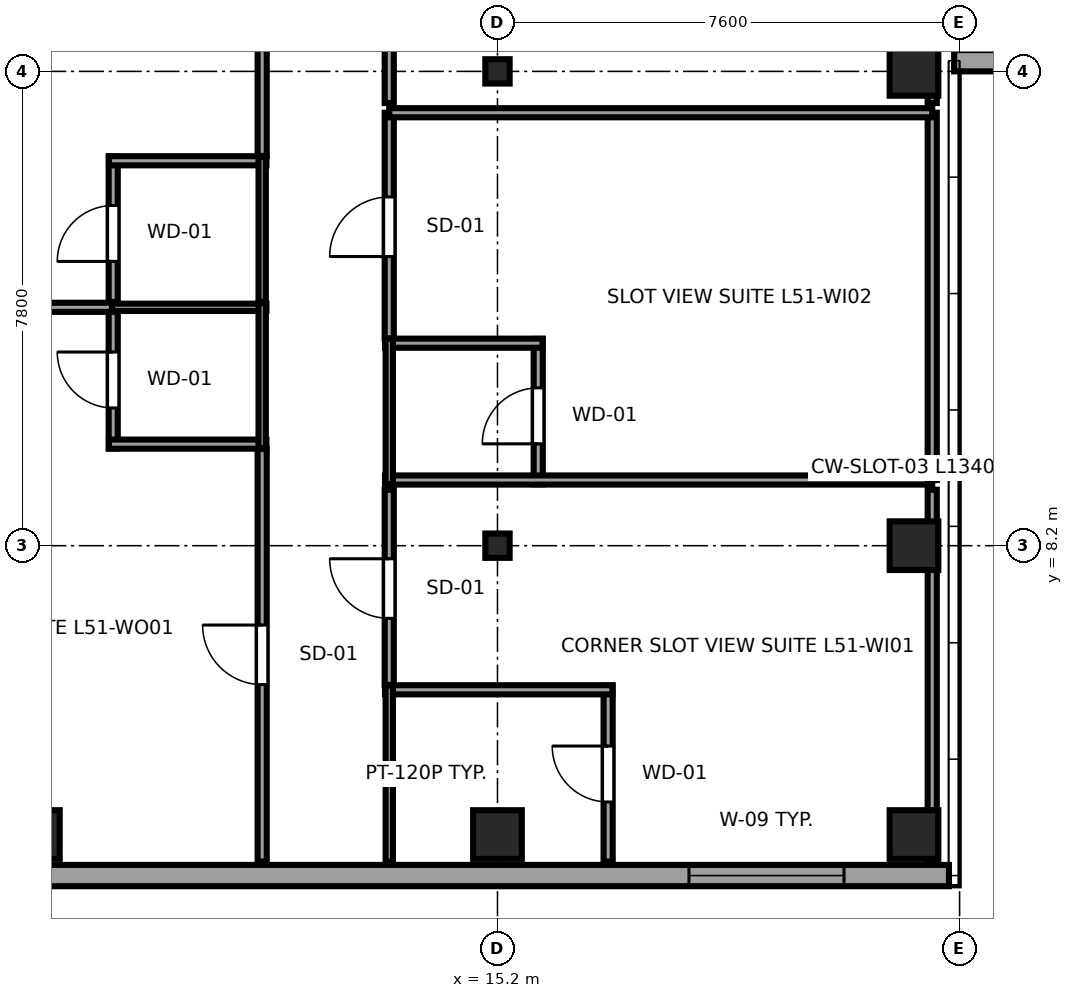
"""IFC4 building model, lengths in metres.
Left out: names, types, materials, properties, quantities, classifications, styles, units other than length and angle.
Written with IfcOpenShell. Run it as: python <this file> out.ifc"""

import sys

from ifc_helpers import new_model, si_unit, direction, frame, frame_2d, origin, origin_2d, place, context, subcontext, project, spatial, rectangle, i_section, extrude, source, transform, mapped, element, fill, save


model = new_model("IFC4")
c1 = context("Model", 3, precision=1e-05, world=origin(), true_north=direction((0.0, 1.0)))
c2 = subcontext(c1, "Body", "Model", "MODEL_VIEW")
j1 = project(units=[si_unit("LENGTHUNIT", "METRE"), si_unit("PLANEANGLEUNIT", "RADIAN")], contexts=[c1])
p1 = place(None, origin())
s1 = spatial("IfcSite", under=j1, at=p1, CompositionType="ELEMENT")
p2 = place(p1, origin())
s2 = spatial("IfcBuilding", under=s1, at=p2, CompositionType="ELEMENT")
p3 = place(p2, frame((0.0, 0.0, 194.65)))
s3 = spatial("IfcBuildingStorey", under=s2, at=p3, CompositionType="ELEMENT", Elevation=194.65)
m1 = source(origin(), c2, "Body", "SweptSolid", [
    extrude(rectangle(XDim=0.8, YDim=0.8, at=origin_2d()), origin(), (0.0, 0.0, 1.0), 3.55),
])
for number, where, z_axis, x_axis in (
    (1, (7.6, 3.45, 0.0), (0.0, 0.0, 1.0), (1.0, 0.0, 0.0)),
    (2, (15.2, 3.45, 0.0), (0.0, 0.0, 1.0), (1.0, 0.0, 0.0)),
):
    element("IfcColumn", number, at=place(p3, frame(where, z_axis=z_axis, x_axis=x_axis)), inside=s3, PredefinedType="COLUMN", context=c2, shape_type="MappedRepresentation", body=[
        mapped(m1, transform((0.0, 0.0, 0.0), x_axis=(1.0, 0.0, 0.0), y_axis=(0.0, 1.0, 0.0), z_axis=(0.0, 0.0, 1.0), scale=1.0)),
    ])
m2 = source(origin(), c2, "Body", "SweptSolid", [
    extrude(i_section(OverallWidth=0.4, OverallDepth=0.4, WebThickness=0.02, FlangeThickness=0.035, at=origin_2d()), origin(), (0.0, 0.0, 1.0), 3.55),
])
for number, where, z_axis, x_axis in (
    (3, (15.2, 8.2, 0.0), (0.0, 0.0, 1.0), (1.0, 0.0, 0.0)),
    (4, (15.2, 16.0, 0.0), (0.0, 0.0, 1.0), (1.0, 0.0, 0.0)),
):
    element("IfcColumn", number, at=place(p3, frame(where, z_axis=z_axis, x_axis=x_axis)), inside=s3, PredefinedType="COLUMN", context=c2, shape_type="MappedRepresentation", body=[
        mapped(m2, transform((0.0, 0.0, 0.0), x_axis=(1.0, 0.0, 0.0), y_axis=(0.0, 1.0, 0.0), z_axis=(0.0, 0.0, 1.0), scale=1.0)),
    ])
for number, where, z_axis, x_axis in (
    (5, (22.05, 3.45, 0.0), (0.0, 0.0, 1.0), (1.0, 0.0, 0.0)),
    (6, (22.05, 8.2, 0.0), (0.0, 0.0, 1.0), (1.0, 0.0, 0.0)),
    (7, (22.05, 16.0, 0.0), (0.0, 0.0, 1.0), (1.0, 0.0, 0.0)),
):
    element("IfcColumn", number, at=place(p3, frame(where, z_axis=z_axis, x_axis=x_axis)), inside=s3, PredefinedType="COLUMN", context=c2, shape_type="MappedRepresentation", body=[
        mapped(m1, transform((0.0, 0.0, 0.0), x_axis=(1.0, 0.0, 0.0), y_axis=(0.0, 1.0, 0.0), z_axis=(0.0, 0.0, 1.0), scale=1.0)),
    ])
p4 = place(p3, frame((7.017, 2.775, 0.0), z_axis=(0.0, 0.0, 1.0), x_axis=(1.0, 0.0, 0.0)))
e8 = element("IfcWall", 8, at=p4, inside=s3, PredefinedType="SOLIDWALL", context=c2, shape_type="SweptSolid", body=[
    extrude(rectangle(XDim=15.608, YDim=0.35, at=frame_2d((7.804, 0.0))), origin(), (0.0, 0.0, 1.0), 3.37),
])
p5 = place(p4, frame((11.332, 0.0, 0.68)))
e9 = element("IfcOpeningElement", 9, at=p5, cuts=e8, PredefinedType="OPENING", context=c2, shape_type="SweptSolid", body=[
    extrude(rectangle(XDim=2.55, YDim=1.92, at=frame_2d((1.275, 0.96))), frame((0.0, 0.185, 0.0), z_axis=(0.0, -1.0, 0.0), x_axis=(1.0, 0.0, 0.0)), (0.0, 0.0, 1.0), 0.37),
])
p6 = place(p3, frame((22.71, 16.175, 0.0), z_axis=(0.0, 0.0, 1.0), x_axis=(1.0, 0.0, 0.0)))
e10 = element("IfcWall", 10, at=p6, inside=s3, PredefinedType="SOLIDWALL", context=c2, shape_type="SweptSolid", body=[
    extrude(rectangle(XDim=11.58, YDim=0.35, at=frame_2d((5.79, 0.0))), origin(), (0.0, 0.0, 1.0), 2.758),
])
p7 = place(p6, frame((1.92, 0.0, 0.68)))
e11 = element("IfcOpeningElement", 11, at=p7, cuts=e10, PredefinedType="OPENING", context=c2, shape_type="SweptSolid", body=[
    extrude(rectangle(XDim=2.55, YDim=1.92, at=frame_2d((1.275, 0.96))), frame((0.0, 0.185, 0.0), z_axis=(0.0, -1.0, 0.0), x_axis=(1.0, 0.0, 0.0)), (0.0, 0.0, 1.0), 0.37),
])
p8 = place(p6, frame((7.11, 0.0, 0.68)))
e12 = element("IfcOpeningElement", 12, at=p8, cuts=e10, PredefinedType="OPENING", context=c2, shape_type="SweptSolid", body=[
    extrude(rectangle(XDim=2.55, YDim=1.92, at=frame_2d((1.275, 0.96))), frame((0.0, 0.185, 0.0), z_axis=(0.0, -1.0, 0.0), x_axis=(1.0, 0.0, 0.0)), (0.0, 0.0, 1.0), 0.37),
])
p9 = place(p3, frame((8.88, 9.8, 0.0), z_axis=(0.0, 0.0, 1.0), x_axis=(0.0, 1.0, 0.0)))
e13 = element("IfcWall", 13, at=p9, inside=s3, PredefinedType="PARTITIONING", context=c2, shape_type="SweptSolid", body=[
    extrude(rectangle(XDim=2.39, YDim=0.15, at=frame_2d((1.195, 0.0))), origin(), (0.0, 0.0, 1.0), 3.37),
])
p10 = place(p9, frame((0.665, 0.0, 0.0)))
e14 = element("IfcOpeningElement", 14, at=p10, cuts=e13, PredefinedType="OPENING", context=c2, shape_type="SweptSolid", body=[
    extrude(rectangle(XDim=0.92, YDim=2.01, at=frame_2d((0.46, 1.005))), frame((0.0, 0.085, 0.0), z_axis=(0.0, -1.0, 0.0), x_axis=(1.0, 0.0, 0.0)), (0.0, 0.0, 1.0), 0.17),
])
p11 = place(p3, frame((8.81, 9.87, 0.0), z_axis=(0.0, 0.0, 1.0), x_axis=(1.0, 0.0, 0.0)))
e15 = element("IfcWall", 15, at=p11, inside=s3, PredefinedType="PARTITIONING", context=c2, shape_type="SweptSolid", body=[
    extrude(rectangle(XDim=2.59, YDim=0.15, at=frame_2d((1.295, 0.0))), origin(), (0.0, 0.0, 1.0), 3.37),
])
p12 = place(p3, frame((8.81, 12.12, 0.0), z_axis=(0.0, 0.0, 1.0), x_axis=(1.0, 0.0, 0.0)))
e16 = element("IfcWall", 16, at=p12, inside=s3, PredefinedType="PLUMBINGWALL", context=c2, shape_type="SweptSolid", body=[
    extrude(rectangle(XDim=2.59, YDim=0.12, at=frame_2d((1.295, 0.0))), origin(), (0.0, 0.0, 1.0), 3.37),
])
p13 = place(p3, frame((11.33, 9.8, 0.0), z_axis=(0.0, 0.0, 1.0), x_axis=(0.0, 1.0, 0.0)))
e17 = element("IfcWall", 17, at=p13, inside=s3, PredefinedType="PLUMBINGWALL", context=c2, shape_type="SweptSolid", body=[
    extrude(rectangle(XDim=2.39, YDim=0.12, at=frame_2d((1.195, 0.0))), origin(), (0.0, 0.0, 1.0), 3.001),
])
p14 = place(p3, frame((8.88, 12.21, 0.0), z_axis=(0.0, 0.0, 1.0), x_axis=(0.0, 1.0, 0.0)))
e18 = element("IfcWall", 18, at=p14, inside=s3, PredefinedType="PARTITIONING", context=c2, shape_type="SweptSolid", body=[
    extrude(rectangle(XDim=2.39, YDim=0.15, at=frame_2d((1.195, 0.0))), origin(), (0.0, 0.0, 1.0), 3.37),
])
p15 = place(p14, frame((0.665, 0.0, 0.0)))
e19 = element("IfcOpeningElement", 19, at=p15, cuts=e18, PredefinedType="OPENING", context=c2, shape_type="SweptSolid", body=[
    extrude(rectangle(XDim=0.92, YDim=2.01, at=frame_2d((0.46, 1.005))), frame((0.0, 0.085, 0.0), z_axis=(0.0, -1.0, 0.0), x_axis=(1.0, 0.0, 0.0)), (0.0, 0.0, 1.0), 0.17),
])
p16 = place(p3, frame((8.81, 14.53, 0.0), z_axis=(0.0, 0.0, 1.0), x_axis=(1.0, 0.0, 0.0)))
e20 = element("IfcWall", 20, at=p16, inside=s3, PredefinedType="PARTITIONING", context=c2, shape_type="SweptSolid", body=[
    extrude(rectangle(XDim=2.59, YDim=0.15, at=frame_2d((1.295, 0.0))), origin(), (0.0, 0.0, 1.0), 3.37),
])
p17 = place(p3, frame((11.33, 12.21, 0.0), z_axis=(0.0, 0.0, 1.0), x_axis=(0.0, 1.0, 0.0)))
e21 = element("IfcWall", 21, at=p17, inside=s3, PredefinedType="PLUMBINGWALL", context=c2, shape_type="SweptSolid", body=[
    extrude(rectangle(XDim=2.39, YDim=0.12, at=frame_2d((1.195, 0.0))), origin(), (0.0, 0.0, 1.0), 3.001),
])
p18 = place(p3, frame((17.02, 3.005, 0.0), z_axis=(0.0, 0.0, 1.0), x_axis=(0.0, 1.0, 0.0)))
e22 = element("IfcWall", 22, at=p18, inside=s3, PredefinedType="PARTITIONING", context=c2, shape_type="SweptSolid", body=[
    extrude(rectangle(XDim=2.895, YDim=0.15, at=frame_2d((1.448, 0.0))), origin(), (0.0, 0.0, 1.0), 3.37),
])
p19 = place(p18, frame((0.98, 0.0, 0.0)))
e23 = element("IfcOpeningElement", 23, at=p19, cuts=e22, PredefinedType="OPENING", context=c2, shape_type="SweptSolid", body=[
    extrude(rectangle(XDim=0.92, YDim=2.01, at=frame_2d((0.46, 1.005))), frame((0.0, 0.085, 0.0), z_axis=(0.0, -1.0, 0.0), x_axis=(1.0, 0.0, 0.0)), (0.0, 0.0, 1.0), 0.17),
])
p20 = place(p3, frame((13.35, 5.83, 0.0), z_axis=(0.0, 0.0, 1.0), x_axis=(1.0, 0.0, 0.0)))
e24 = element("IfcWall", 24, at=p20, inside=s3, PredefinedType="PARTITIONING", context=c2, shape_type="SweptSolid", body=[
    extrude(rectangle(XDim=3.74, YDim=0.15, at=frame_2d((1.87, 0.0))), origin(), (0.0, 0.0, 1.0), 3.37),
])
p21 = place(p3, frame((13.42, 3.005, 0.0), z_axis=(0.0, 0.0, 1.0), x_axis=(0.0, 1.0, 0.0)))
e25 = element("IfcWall", 25, at=p21, inside=s3, PredefinedType="PLUMBINGWALL", context=c2, shape_type="SweptSolid", body=[
    extrude(rectangle(XDim=2.895, YDim=0.12, at=frame_2d((1.448, 0.0))), origin(), (0.0, 0.0, 1.0), 3.37),
])
p22 = place(p3, frame((15.87, 9.21, 0.0), z_axis=(0.0, 0.0, 1.0), x_axis=(0.0, 1.0, 0.0)))
e26 = element("IfcWall", 26, at=p22, inside=s3, PredefinedType="PARTITIONING", context=c2, shape_type="SweptSolid", body=[
    extrude(rectangle(XDim=2.39, YDim=0.15, at=frame_2d((1.195, 0.0))), origin(), (0.0, 0.0, 1.0), 3.37),
])
p23 = place(p22, frame((0.665, 0.0, 0.0)))
e27 = element("IfcOpeningElement", 27, at=p23, cuts=e26, PredefinedType="OPENING", context=c2, shape_type="SweptSolid", body=[
    extrude(rectangle(XDim=0.92, YDim=2.01, at=frame_2d((0.46, 1.005))), frame((0.0, 0.085, 0.0), z_axis=(0.0, -1.0, 0.0), x_axis=(1.0, 0.0, 0.0)), (0.0, 0.0, 1.0), 0.17),
])
p24 = place(p3, frame((13.35, 9.28, 0.0), z_axis=(0.0, 0.0, 1.0), x_axis=(1.0, 0.0, 0.0)))
e28 = element("IfcWall", 28, at=p24, inside=s3, PredefinedType="PARTITIONING", context=c2, shape_type="SweptSolid", body=[
    extrude(rectangle(XDim=9.0, YDim=0.15, at=frame_2d((4.5, 0.0))), origin(), (0.0, 0.0, 1.0), 3.37),
])
p25 = place(p3, frame((13.35, 11.53, 0.0), z_axis=(0.0, 0.0, 1.0), x_axis=(1.0, 0.0, 0.0)))
e29 = element("IfcWall", 29, at=p25, inside=s3, PredefinedType="PARTITIONING", context=c2, shape_type="SweptSolid", body=[
    extrude(rectangle(XDim=2.59, YDim=0.15, at=frame_2d((1.295, 0.0))), origin(), (0.0, 0.0, 1.0), 3.37),
])
p26 = place(p3, frame((13.42, 9.21, 0.0), z_axis=(0.0, 0.0, 1.0), x_axis=(0.0, 1.0, 0.0)))
e30 = element("IfcWall", 30, at=p26, inside=s3, PredefinedType="PLUMBINGWALL", context=c2, shape_type="SweptSolid", body=[
    extrude(rectangle(XDim=2.39, YDim=0.12, at=frame_2d((1.195, 0.0))), origin(), (0.0, 0.0, 1.0), 3.37),
])
p27 = place(p3, frame((11.33, 3.005, 0.0), z_axis=(0.0, 0.0, 1.0), x_axis=(0.0, 1.0, 0.0)))
e31 = element("IfcWall", 31, at=p27, inside=s3, PredefinedType="PARTITIONING", context=c2, shape_type="SweptSolid", body=[
    extrude(rectangle(XDim=6.785, YDim=0.15, at=frame_2d((3.393, 0.0))), origin(), (0.0, 0.0, 1.0), 3.001),
])
p28 = place(p27, frame((2.91, 0.0, 0.0)))
e32 = element("IfcOpeningElement", 32, at=p28, cuts=e31, PredefinedType="OPENING", context=c2, shape_type="SweptSolid", body=[
    extrude(rectangle(XDim=0.98, YDim=2.12, at=frame_2d((0.49, 1.06))), frame((0.0, 0.085, 0.0), z_axis=(0.0, -1.0, 0.0), x_axis=(1.0, 0.0, 0.0)), (0.0, 0.0, 1.0), 0.17),
])
p29 = place(p3, frame((2.9, 12.12, 0.0), z_axis=(0.0, 0.0, 1.0), x_axis=(1.0, 0.0, 0.0)))
e33 = element("IfcWall", 33, at=p29, inside=s3, PredefinedType="PARTITIONING", context=c2, shape_type="SweptSolid", body=[
    extrude(rectangle(XDim=5.96, YDim=0.15, at=frame_2d((2.98, 0.0))), origin(), (0.0, 0.0, 1.0), 3.37),
])
p30 = place(p3, frame((11.33, 14.61, 0.0), z_axis=(0.0, 0.0, 1.0), x_axis=(0.0, 1.0, 0.0)))
e34 = element("IfcWall", 34, at=p30, inside=s3, PredefinedType="PARTITIONING", context=c2, shape_type="SweptSolid", body=[
    extrude(rectangle(XDim=6.81, YDim=0.15, at=frame_2d((3.405, 0.0))), origin(), (0.0, 0.0, 1.0), 3.001),
])
p31 = place(p30, frame((2.895, 0.0, 0.0)))
e35 = element("IfcOpeningElement", 35, at=p31, cuts=e34, PredefinedType="OPENING", context=c2, shape_type="SweptSolid", body=[
    extrude(rectangle(XDim=0.98, YDim=2.12, at=frame_2d((0.49, 1.06))), frame((0.0, 0.085, 0.0), z_axis=(0.0, -1.0, 0.0), x_axis=(1.0, 0.0, 0.0)), (0.0, 0.0, 1.0), 0.17),
])
p32 = place(p3, frame((13.42, 5.91, 0.0), z_axis=(0.0, 0.0, 1.0), x_axis=(0.0, 1.0, 0.0)))
e36 = element("IfcWall", 36, at=p32, inside=s3, PredefinedType="PARTITIONING", context=c2, shape_type="SweptSolid", body=[
    extrude(rectangle(XDim=3.21, YDim=0.15, at=frame_2d((1.605, 0.0))), origin(), (0.0, 0.0, 1.0), 3.37),
])
p33 = place(p32, frame((1.095, 0.0, 0.0)))
e37 = element("IfcOpeningElement", 37, at=p33, cuts=e36, PredefinedType="OPENING", context=c2, shape_type="SweptSolid", body=[
    extrude(rectangle(XDim=0.98, YDim=2.12, at=frame_2d((0.49, 1.06))), frame((0.0, 0.085, 0.0), z_axis=(0.0, -1.0, 0.0), x_axis=(1.0, 0.0, 0.0)), (0.0, 0.0, 1.0), 0.17),
])
p34 = place(p3, frame((22.35, 3.005, 0.0), z_axis=(0.0, 0.0, 1.0), x_axis=(0.0, 1.0, 0.0)))
e38 = element("IfcWall", 38, at=p34, inside=s3, PredefinedType="PARTITIONING", context=c2, shape_type="SweptSolid", body=[
    extrude(rectangle(XDim=6.115, YDim=0.15, at=frame_2d((3.058, 0.0))), origin(), (0.0, 0.0, 1.0), 3.37),
])
p35 = place(p3, frame((13.42, 11.61, 0.0), z_axis=(0.0, 0.0, 1.0), x_axis=(0.0, 1.0, 0.0)))
e39 = element("IfcWall", 39, at=p35, inside=s3, PredefinedType="PARTITIONING", context=c2, shape_type="SweptSolid", body=[
    extrude(rectangle(XDim=3.71, YDim=0.15, at=frame_2d((1.855, 0.0))), origin(), (0.0, 0.0, 1.0), 3.37),
])
p36 = place(p35, frame((1.345, 0.0, 0.0)))
e40 = element("IfcOpeningElement", 40, at=p36, cuts=e39, PredefinedType="OPENING", context=c2, shape_type="SweptSolid", body=[
    extrude(rectangle(XDim=0.98, YDim=2.12, at=frame_2d((0.49, 1.06))), frame((0.0, 0.085, 0.0), z_axis=(0.0, -1.0, 0.0), x_axis=(1.0, 0.0, 0.0)), (0.0, 0.0, 1.0), 0.17),
])
p37 = place(p3, frame((22.35, 9.28, 0.0), z_axis=(0.0, 0.0, 1.0), x_axis=(0.0, 1.0, 0.0)))
e41 = element("IfcWall", 41, at=p37, inside=s3, PredefinedType="PARTITIONING", context=c2, shape_type="SweptSolid", body=[
    extrude(rectangle(XDim=6.04, YDim=0.15, at=frame_2d((3.02, 0.0))), origin(), (0.0, 0.0, 1.0), 3.37),
])
p38 = place(p3, frame((13.42, 15.32, 0.0), z_axis=(0.0, 0.0, 1.0), x_axis=(1.0, 0.0, 0.0)))
e42 = element("IfcWall", 42, at=p38, inside=s3, PredefinedType="PARTITIONING", context=c2, shape_type="SweptSolid", body=[
    extrude(rectangle(XDim=8.93, YDim=0.15, at=frame_2d((4.465, 0.0))), origin(), (0.0, 0.0, 1.0), 3.37),
])
p39 = place(p3, frame((13.42, 15.48, 0.0), z_axis=(0.0, 0.0, 1.0), x_axis=(0.0, 1.0, 0.0)))
e43 = element("IfcWall", 43, at=p39, inside=s3, PredefinedType="PARTITIONING", context=c2, shape_type="SweptSolid", body=[
    extrude(rectangle(XDim=3.61, YDim=0.15, at=frame_2d((1.805, 0.0))), origin(), (0.0, 0.0, 1.0), 3.37),
])
p40 = place(p39, frame((1.295, 0.0, 0.0)))
e44 = element("IfcOpeningElement", 44, at=p40, cuts=e43, PredefinedType="OPENING", context=c2, shape_type="SweptSolid", body=[
    extrude(rectangle(XDim=0.98, YDim=2.12, at=frame_2d((0.49, 1.06))), frame((0.0, 0.085, 0.0), z_axis=(0.0, -1.0, 0.0), x_axis=(1.0, 0.0, 0.0)), (0.0, 0.0, 1.0), 0.17),
])
p41 = place(p3, frame((22.35, 15.48, 0.0), z_axis=(0.0, 0.0, 1.0), x_axis=(0.0, 1.0, 0.0)))
e45 = element("IfcWall", 45, at=p41, inside=s3, PredefinedType="PARTITIONING", context=c2, shape_type="SweptSolid", body=[
    extrude(rectangle(XDim=5.94, YDim=0.15, at=frame_2d((2.97, 0.0))), origin(), (0.0, 0.0, 1.0), 3.37),
])
m3 = source(origin(), c2, "Body", "SweptSolid", [
    extrude(rectangle(XDim=2.55, YDim=1.92, at=frame_2d((1.275, 0.96))), frame((0.0, 0.09, 0.0), z_axis=(0.0, -1.0, 0.0), x_axis=(1.0, 0.0, 0.0)), (0.0, 0.0, 1.0), 0.06),
])
p42 = place(p5, origin())
e46 = element("IfcWindow", 46, at=p42, inside=s3, PartitioningType="TRIPLE_PANEL_HORIZONTAL", PredefinedType="WINDOW", context=c2, shape_type="MappedRepresentation", body=[
    mapped(m3, transform((0.0, 0.0, 0.0), x_axis=(1.0, 0.0, 0.0), y_axis=(0.0, 1.0, 0.0), z_axis=(0.0, 0.0, 1.0), scale=1.0)),
])
fill(e9, e46)
m4 = source(origin(), c2, "Body", "SweptSolid", [
    extrude(rectangle(XDim=0.92, YDim=2.01, at=frame_2d((0.46, 1.005))), frame((0.0, 0.025, 0.0), z_axis=(0.0, -1.0, 0.0), x_axis=(1.0, 0.0, 0.0)), (0.0, 0.0, 1.0), 0.05),
])
p43 = place(p10, origin())
e47 = element("IfcDoor", 47, at=p43, inside=s3, OperationType="SINGLE_SWING_RIGHT", PredefinedType="DOOR", context=c2, shape_type="MappedRepresentation", body=[
    mapped(m4, transform((0.0, 0.0, 0.0), x_axis=(1.0, 0.0, 0.0), y_axis=(0.0, 1.0, 0.0), z_axis=(0.0, 0.0, 1.0), scale=1.0)),
])
fill(e14, e47)
p44 = place(p15, origin())
e48 = element("IfcDoor", 48, at=p44, inside=s3, OperationType="SINGLE_SWING_LEFT", PredefinedType="DOOR", context=c2, shape_type="MappedRepresentation", body=[
    mapped(m4, transform((0.0, 0.0, 0.0), x_axis=(1.0, 0.0, 0.0), y_axis=(0.0, 1.0, 0.0), z_axis=(0.0, 0.0, 1.0), scale=1.0)),
])
fill(e19, e48)
p45 = place(p19, origin())
e49 = element("IfcDoor", 49, at=p45, inside=s3, OperationType="SINGLE_SWING_RIGHT", PredefinedType="DOOR", context=c2, shape_type="MappedRepresentation", body=[
    mapped(m4, transform((0.0, 0.0, 0.0), x_axis=(1.0, 0.0, 0.0), y_axis=(0.0, 1.0, 0.0), z_axis=(0.0, 0.0, 1.0), scale=1.0)),
])
fill(e23, e49)
p46 = place(p23, origin())
e50 = element("IfcDoor", 50, at=p46, inside=s3, OperationType="SINGLE_SWING_LEFT", PredefinedType="DOOR", context=c2, shape_type="MappedRepresentation", body=[
    mapped(m4, transform((0.0, 0.0, 0.0), x_axis=(1.0, 0.0, 0.0), y_axis=(0.0, 1.0, 0.0), z_axis=(0.0, 0.0, 1.0), scale=1.0)),
])
fill(e27, e50)
m5 = source(origin(), c2, "Body", "SweptSolid", [
    extrude(rectangle(XDim=0.98, YDim=2.12, at=frame_2d((0.49, 1.06))), frame((0.0, 0.025, 0.0), z_axis=(0.0, -1.0, 0.0), x_axis=(1.0, 0.0, 0.0)), (0.0, 0.0, 1.0), 0.05),
])
p47 = place(p28, origin())
e51 = element("IfcDoor", 51, at=p47, inside=s3, OperationType="SINGLE_SWING_RIGHT", PredefinedType="DOOR", context=c2, shape_type="MappedRepresentation", body=[
    mapped(m5, transform((0.0, 0.0, 0.0), x_axis=(1.0, 0.0, 0.0), y_axis=(0.0, 1.0, 0.0), z_axis=(0.0, 0.0, 1.0), scale=1.0)),
])
fill(e32, e51)
p48 = place(p33, origin())
e52 = element("IfcDoor", 52, at=p48, inside=s3, OperationType="SINGLE_SWING_RIGHT", PredefinedType="DOOR", context=c2, shape_type="MappedRepresentation", body=[
    mapped(m5, transform((0.0, 0.0, 0.0), x_axis=(1.0, 0.0, 0.0), y_axis=(0.0, 1.0, 0.0), z_axis=(0.0, 0.0, 1.0), scale=1.0)),
])
fill(e37, e52)
p49 = place(p36, origin())
e53 = element("IfcDoor", 53, at=p49, inside=s3, OperationType="SINGLE_SWING_LEFT", PredefinedType="DOOR", context=c2, shape_type="MappedRepresentation", body=[
    mapped(m5, transform((0.0, 0.0, 0.0), x_axis=(1.0, 0.0, 0.0), y_axis=(0.0, 1.0, 0.0), z_axis=(0.0, 0.0, 1.0), scale=1.0)),
])
fill(e40, e53)
save(model, sys.argv[1])
